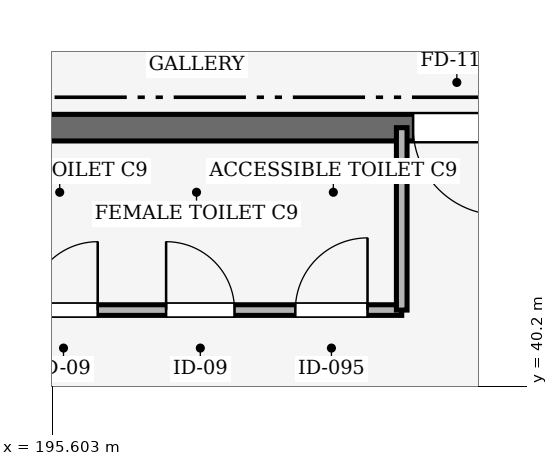
"""IFC4 building model, lengths in metres.
Left out: names, types, materials, properties, quantities, classifications, styles, units other than length and angle.
Written with IfcOpenShell. Run it as: python <this file> out.ifc"""

import sys

from ifc_helpers import new_model, si_unit, direction, frame, frame_2d, origin, place, context, subcontext, project, spatial, rectangle, extrude, element, fill, save


model = new_model("IFC4")
c1 = context("Model", 3, precision=1e-05, world=origin(), true_north=direction((0.0, 1.0)))
c2 = subcontext(c1, "Body", "Model", "MODEL_VIEW")
j1 = project(units=[si_unit("LENGTHUNIT", "METRE"), si_unit("PLANEANGLEUNIT", "RADIAN")], contexts=[c1])
p1 = place(None, origin())
s1 = spatial("IfcSite", under=j1, at=p1, CompositionType="ELEMENT")
p2 = place(p1, origin())
s2 = spatial("IfcBuilding", under=s1, at=p2, CompositionType="ELEMENT")
p3 = place(p2, frame((0.0, 0.0, 10.8)))
s3 = spatial("IfcBuildingStorey", under=s2, at=p3, CompositionType="ELEMENT", Elevation=10.8)
p4 = place(p3, frame((202.6, 43.6, 0.0), z_axis=(0.0, 0.0, 1.0), x_axis=(-1.0, 0.0, 0.0)))
e1 = element("IfcWall", 1, at=p4, inside=s3, PredefinedType="SHEAR", context=c2, shape_type="SweptSolid", body=[
    extrude(rectangle(XDim=7.8, YDim=0.35, at=frame_2d((3.9, 0.0))), origin(), (0.0, 0.0, 1.0), 5.4),
])
p5 = place(p4, frame((1.1, 0.0, 0.0)))
e2 = element("IfcOpeningElement", 2, at=p5, cuts=e1, PredefinedType="OPENING", context=c2, shape_type="SweptSolid", body=[
    extrude(rectangle(XDim=1.15, YDim=2.15, at=frame_2d((0.575, 1.075))), frame((0.0, 0.185, 0.0), z_axis=(0.0, -1.0, 0.0), x_axis=(1.0, 0.0, 0.0)), (0.0, 0.0, 1.0), 0.37),
])
p6 = place(p3, frame((194.8, 41.2, 0.0), z_axis=(0.0, 0.0, 1.0), x_axis=(1.0, 0.0, 0.0)))
e3 = element("IfcWall", 3, at=p6, inside=s3, PredefinedType="PARTITIONING", context=c2, shape_type="SweptSolid", body=[
    extrude(rectangle(XDim=5.4, YDim=0.14, at=frame_2d((2.7, 0.0))), origin(), (0.0, 0.0, 1.0), 4.5),
])
p7 = place(p6, frame((0.5, 0.0, 0.0)))
e4 = element("IfcOpeningElement", 4, at=p7, cuts=e3, PredefinedType="OPENING", context=c2, shape_type="SweptSolid", body=[
    extrude(rectangle(XDim=0.9, YDim=2.1, at=frame_2d((0.45, 1.05))), frame((0.0, 0.08, 0.0), z_axis=(0.0, -1.0, 0.0), x_axis=(1.0, 0.0, 0.0)), (0.0, 0.0, 1.0), 0.16),
])
p8 = place(p6, frame((2.3, 0.0, 0.0)))
e5 = element("IfcOpeningElement", 5, at=p8, cuts=e3, PredefinedType="OPENING", context=c2, shape_type="SweptSolid", body=[
    extrude(rectangle(XDim=0.9, YDim=2.1, at=frame_2d((0.45, 1.05))), frame((0.0, 0.08, 0.0), z_axis=(0.0, -1.0, 0.0), x_axis=(1.0, 0.0, 0.0)), (0.0, 0.0, 1.0), 0.16),
])
p9 = place(p6, frame((4.0, 0.0, 0.0)))
e6 = element("IfcOpeningElement", 6, at=p9, cuts=e3, PredefinedType="OPENING", context=c2, shape_type="SweptSolid", body=[
    extrude(rectangle(XDim=0.95, YDim=2.1, at=frame_2d((0.475, 1.05))), frame((0.0, 0.08, 0.0), z_axis=(0.0, -1.0, 0.0), x_axis=(1.0, 0.0, 0.0)), (0.0, 0.0, 1.0), 0.16),
])
p10 = place(p3, frame((200.2, 41.2, 0.0), z_axis=(0.0, 0.0, 1.0), x_axis=(0.0, 1.0, 0.0)))
e7 = element("IfcWall", 7, at=p10, inside=s3, PredefinedType="PARTITIONING", context=c2, shape_type="SweptSolid", body=[
    extrude(rectangle(XDim=2.4, YDim=0.14, at=frame_2d((1.2, 0.0))), origin(), (0.0, 0.0, 1.0), 4.5),
])
p11 = place(p5, origin())
e8 = element("IfcDoor", 8, at=p11, inside=s3, OperationType="SINGLE_SWING_LEFT", PredefinedType="DOOR", context=c2, shape_type="SweptSolid", body=[
    extrude(rectangle(XDim=1.15, YDim=2.15, at=frame_2d((0.575, 1.075))), frame((0.0, 0.025, 0.0), z_axis=(0.0, -1.0, 0.0), x_axis=(1.0, 0.0, 0.0)), (0.0, 0.0, 1.0), 0.05),
])
fill(e2, e8)
p12 = place(p7, origin())
e9 = element("IfcDoor", 9, at=p12, inside=s3, OperationType="SINGLE_SWING_RIGHT", PredefinedType="DOOR", context=c2, shape_type="SweptSolid", body=[
    extrude(rectangle(XDim=0.9, YDim=2.1, at=frame_2d((0.45, 1.05))), frame((0.0, 0.025, 0.0), z_axis=(0.0, -1.0, 0.0), x_axis=(1.0, 0.0, 0.0)), (0.0, 0.0, 1.0), 0.05),
])
fill(e4, e9)
p13 = place(p8, origin())
e10 = element("IfcDoor", 10, at=p13, inside=s3, OperationType="SINGLE_SWING_LEFT", PredefinedType="DOOR", context=c2, shape_type="SweptSolid", body=[
    extrude(rectangle(XDim=0.9, YDim=2.1, at=frame_2d((0.45, 1.05))), frame((0.0, 0.025, 0.0), z_axis=(0.0, -1.0, 0.0), x_axis=(1.0, 0.0, 0.0)), (0.0, 0.0, 1.0), 0.05),
])
fill(e5, e10)
p14 = place(p9, origin())
e11 = element("IfcDoor", 11, at=p14, inside=s3, OperationType="SINGLE_SWING_RIGHT", PredefinedType="DOOR", context=c2, shape_type="SweptSolid", body=[
    extrude(rectangle(XDim=0.95, YDim=2.1, at=frame_2d((0.475, 1.05))), frame((0.0, 0.025, 0.0), z_axis=(0.0, -1.0, 0.0), x_axis=(1.0, 0.0, 0.0)), (0.0, 0.0, 1.0), 0.05),
])
fill(e6, e11)
save(model, sys.argv[1])
